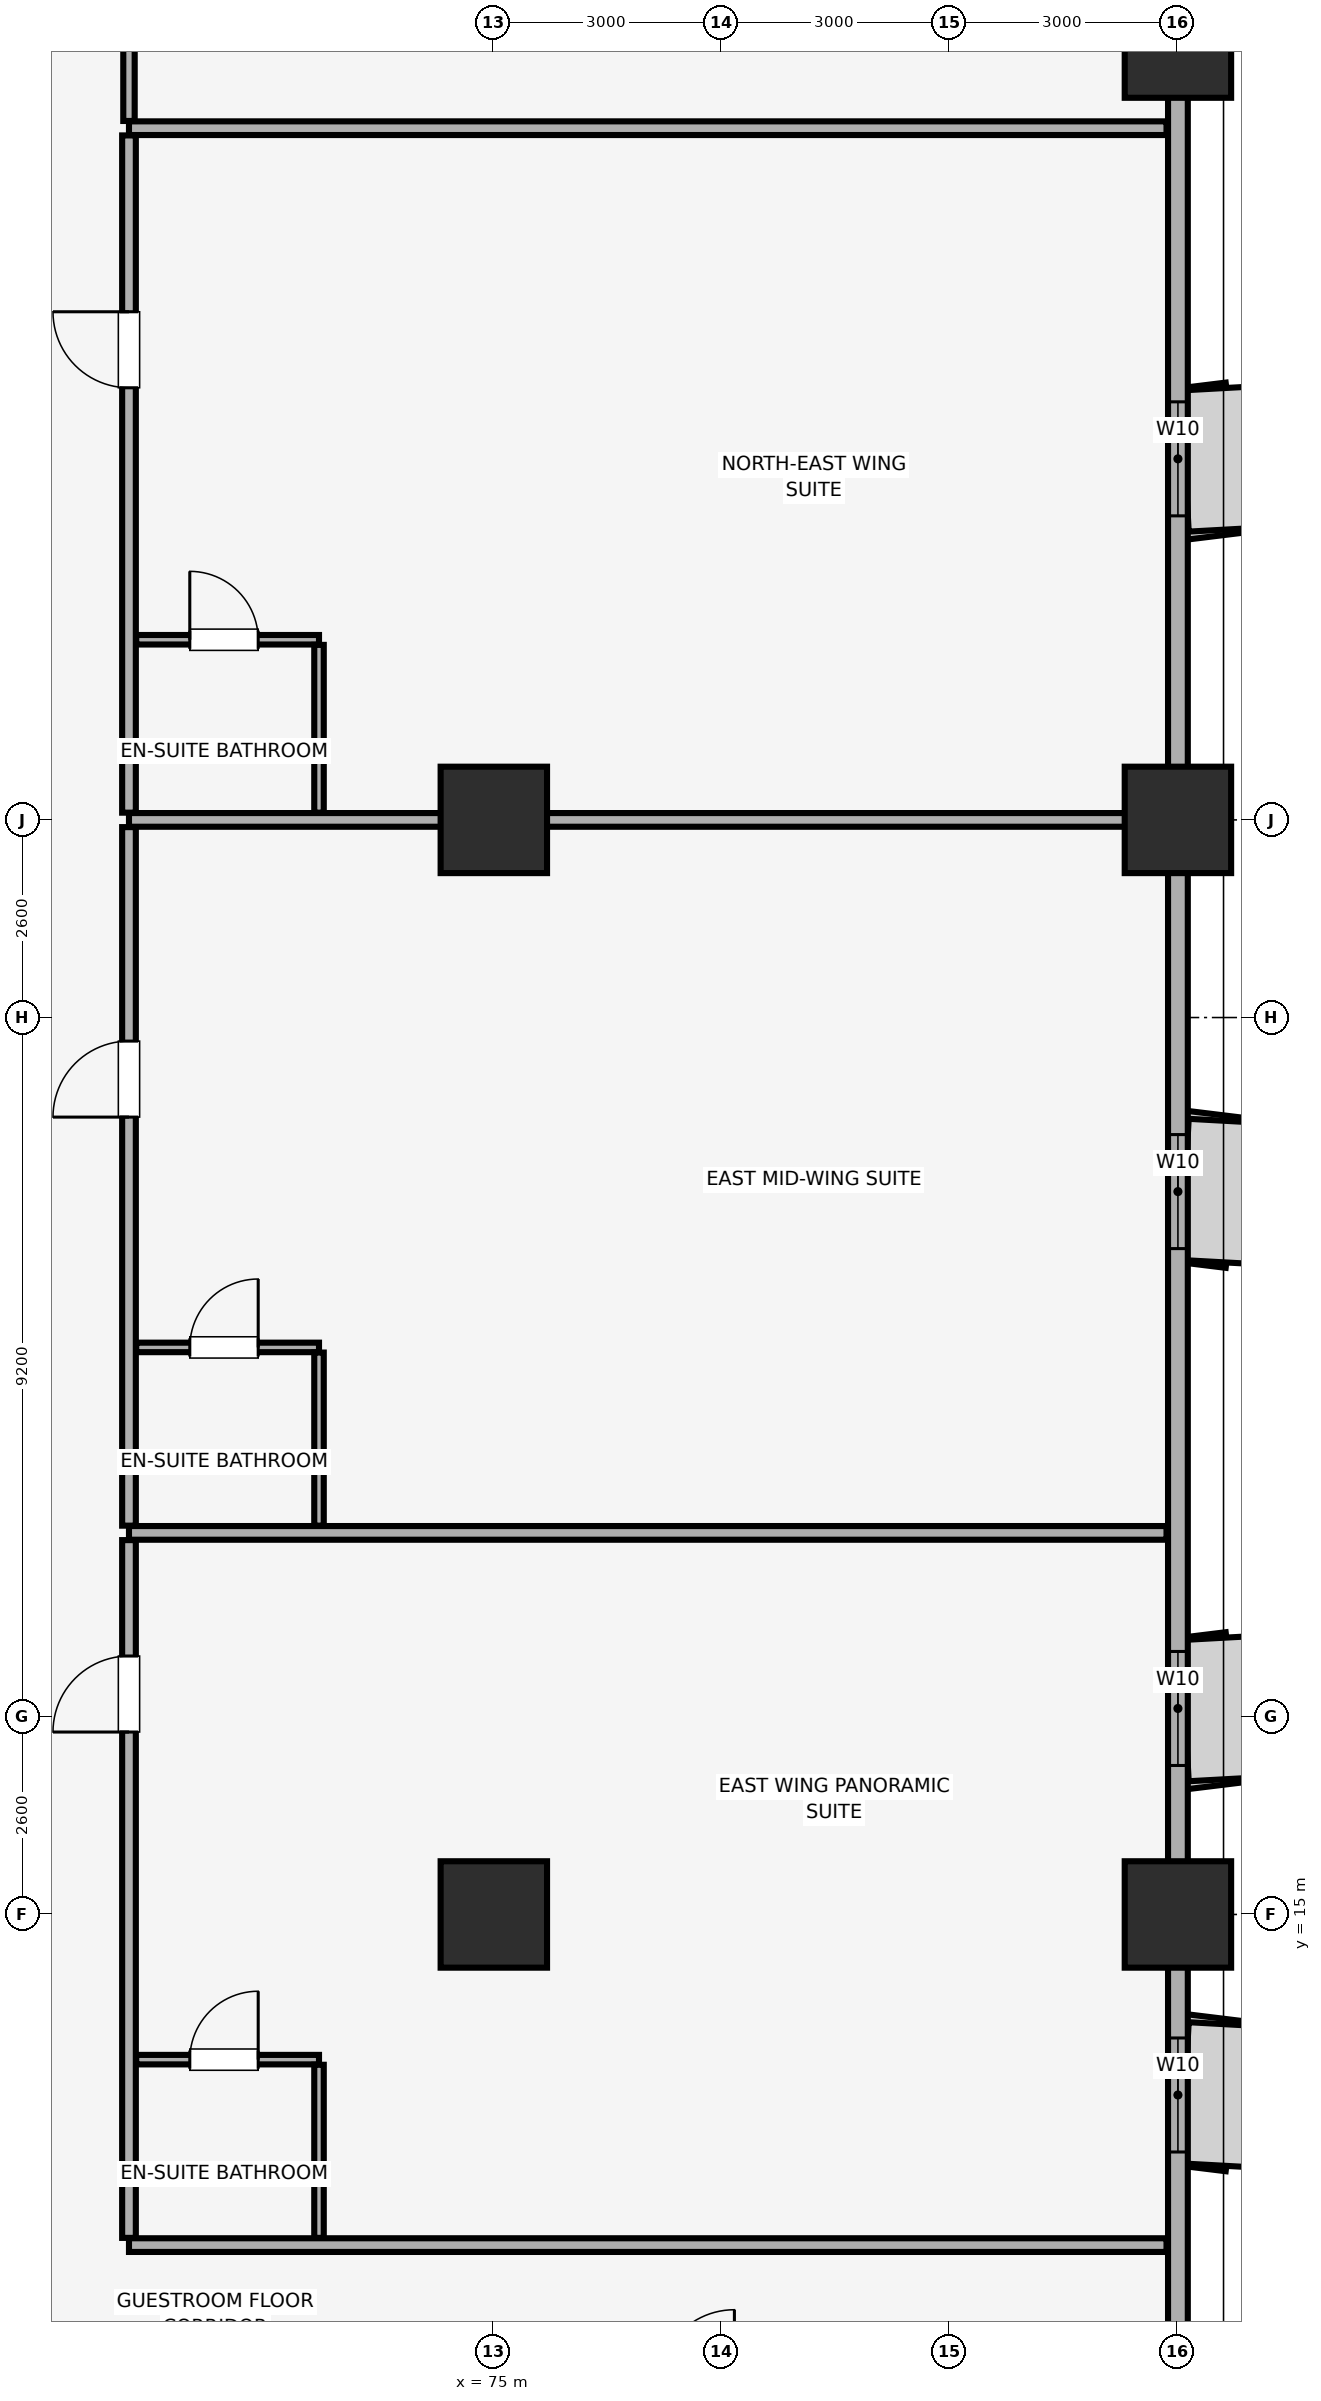
"""IFC4 building model, lengths in metres.
Left out: names, types, materials, properties, quantities, classifications, styles, units other than length and angle.
Written with IfcOpenShell. Run it as: python <this file> out.ifc"""

import sys

from ifc_helpers import new_model, si_unit, direction, frame, frame_2d, origin, origin_2d, place, context, subcontext, project, spatial, rectangle, extrude, element, fill, save


model = new_model("IFC4")
c1 = context("Model", 3, precision=1e-05, world=origin(), true_north=direction((0.0, 1.0)))
c2 = subcontext(c1, "Body", "Model", "MODEL_VIEW")
j1 = project(units=[si_unit("LENGTHUNIT", "METRE"), si_unit("PLANEANGLEUNIT", "RADIAN")], contexts=[c1])
p1 = place(None, origin())
s1 = spatial("IfcSite", under=j1, at=p1, CompositionType="ELEMENT")
p2 = place(p1, origin())
s2 = spatial("IfcBuilding", under=s1, at=p2, CompositionType="ELEMENT")
p3 = place(p2, frame((0.0, 0.0, 35.15)))
s3 = spatial("IfcBuildingStorey", under=s2, at=p3, CompositionType="ELEMENT", Elevation=35.15)
for number, where, z_axis, x_axis in (
    (1, (84.0, 15.0, 0.0), (0.0, 0.0, 1.0), (1.0, 0.0, 0.0)),
    (2, (84.0, 29.4, 0.0), (0.0, 0.0, 1.0), (1.0, 0.0, 0.0)),
    (3, (84.0, 39.6, 0.0), (0.0, 0.0, 1.0), (1.0, 0.0, 0.0)),
    (4, (75.0, 15.0, 0.0), (0.0, 0.0, 1.0), (1.0, 0.0, 0.0)),
    (5, (75.0, 29.4, 0.0), (0.0, 0.0, 1.0), (1.0, 0.0, 0.0)),
):
    element("IfcColumn", number, at=place(p3, frame(where, z_axis=z_axis, x_axis=x_axis)), inside=s3, PredefinedType="COLUMN", context=c2, shape_type="SweptSolid", body=[
        extrude(rectangle(XDim=1.4, YDim=1.4, at=origin_2d()), origin(), (0.0, 0.0, 1.0), 3.51),
    ])
p4 = place(p3, frame((84.0, 4.2, 0.0), z_axis=(0.0, 0.0, 1.0), x_axis=(0.0, 1.0, 0.0)))
e6 = element("IfcWall", 6, at=p4, inside=s3, PredefinedType="SOLIDWALL", context=c2, shape_type="SweptSolid", body=[
    extrude(rectangle(XDim=40.6, YDim=0.26, at=frame_2d((20.3, 0.0))), origin(), (0.0, 0.0, 1.0), 2.56),
])
p5 = place(p4, frame((7.675, 0.0, 0.85)))
e7 = element("IfcOpeningElement", 7, at=p5, cuts=e6, PredefinedType="OPENING", context=c2, shape_type="SweptSolid", body=[
    extrude(rectangle(XDim=1.5, YDim=1.4, at=frame_2d((0.75, 0.7))), frame((0.0, 0.14, 0.0), z_axis=(0.0, -1.0, 0.0), x_axis=(1.0, 0.0, 0.0)), (0.0, 0.0, 1.0), 0.28),
])
p6 = place(p4, frame((12.76, 0.0, 0.85)))
e8 = element("IfcOpeningElement", 8, at=p6, cuts=e6, PredefinedType="OPENING", context=c2, shape_type="SweptSolid", body=[
    extrude(rectangle(XDim=1.5, YDim=1.4, at=frame_2d((0.75, 0.7))), frame((0.0, 0.14, 0.0), z_axis=(0.0, -1.0, 0.0), x_axis=(1.0, 0.0, 0.0)), (0.0, 0.0, 1.0), 0.28),
])
p7 = place(p4, frame((19.56, 0.0, 0.85)))
e9 = element("IfcOpeningElement", 9, at=p7, cuts=e6, PredefinedType="OPENING", context=c2, shape_type="SweptSolid", body=[
    extrude(rectangle(XDim=1.5, YDim=1.4, at=frame_2d((0.75, 0.7))), frame((0.0, 0.14, 0.0), z_axis=(0.0, -1.0, 0.0), x_axis=(1.0, 0.0, 0.0)), (0.0, 0.0, 1.0), 0.28),
])
p8 = place(p4, frame((29.2, 0.0, 0.85)))
e10 = element("IfcOpeningElement", 10, at=p8, cuts=e6, PredefinedType="OPENING", context=c2, shape_type="SweptSolid", body=[
    extrude(rectangle(XDim=1.5, YDim=1.4, at=frame_2d((0.75, 0.7))), frame((0.0, 0.14, 0.0), z_axis=(0.0, -1.0, 0.0), x_axis=(1.0, 0.0, 0.0)), (0.0, 0.0, 1.0), 0.28),
])
p9 = place(p4, frame((37.365, 0.0, 0.85)))
e11 = element("IfcOpeningElement", 11, at=p9, cuts=e6, PredefinedType="OPENING", context=c2, shape_type="SweptSolid", body=[
    extrude(rectangle(XDim=1.5, YDim=1.4, at=frame_2d((0.75, 0.7))), frame((0.0, 0.14, 0.0), z_axis=(0.0, -1.0, 0.0), x_axis=(1.0, 0.0, 0.0)), (0.0, 0.0, 1.0), 0.28),
])
for number, where, z_axis, x_axis in (
    (12, (70.2, 10.65, 0.0), (0.0, 0.0, 1.0), (1.0, 0.0, 0.0)),
    (13, (70.2, 20.02, 0.0), (0.0, 0.0, 1.0), (1.0, 0.0, 0.0)),
):
    element("IfcWall", number, at=place(p3, frame(where, z_axis=z_axis, x_axis=x_axis)), inside=s3, PredefinedType="PARTITIONING", context=c2, shape_type="SweptSolid", body=[
        extrude(rectangle(XDim=13.65, YDim=0.18, at=frame_2d((6.825, 0.0))), origin(), (0.0, 0.0, 1.0), 3.51),
    ])
p10 = place(p3, frame((70.2, 10.745, 0.0), z_axis=(0.0, 0.0, 1.0), x_axis=(0.0, 1.0, 0.0)))
e14 = element("IfcWall", 14, at=p10, inside=s3, PredefinedType="PARTITIONING", context=c2, shape_type="SweptSolid", body=[
    extrude(rectangle(XDim=9.18, YDim=0.18, at=frame_2d((4.59, 0.0))), origin(), (0.0, 0.0, 1.0), 3.51),
])
p11 = place(p10, frame((6.655, 0.0, 0.0)))
e15 = element("IfcOpeningElement", 15, at=p11, cuts=e14, PredefinedType="OPENING", context=c2, shape_type="SweptSolid", body=[
    extrude(rectangle(XDim=1.0, YDim=2.15, at=frame_2d((0.5, 1.075))), frame((0.0, 0.1, 0.0), z_axis=(0.0, -1.0, 0.0), x_axis=(1.0, 0.0, 0.0)), (0.0, 0.0, 1.0), 0.2),
])
p12 = place(p3, frame((70.295, 13.09, 0.0), z_axis=(0.0, 0.0, 1.0), x_axis=(1.0, 0.0, 0.0)))
e16 = element("IfcWall", 16, at=p12, inside=s3, PredefinedType="PARTITIONING", context=c2, shape_type="SweptSolid", body=[
    extrude(rectangle(XDim=2.405, YDim=0.125, at=frame_2d((1.203, 0.0))), origin(), (0.0, 0.0, 1.0), 3.51),
])
p13 = place(p12, frame((0.705, 0.0, 0.0)))
e17 = element("IfcOpeningElement", 17, at=p13, cuts=e16, PredefinedType="OPENING", context=c2, shape_type="SweptSolid", body=[
    extrude(rectangle(XDim=0.9, YDim=2.1, at=frame_2d((0.45, 1.05))), frame((0.0, 0.073, 0.0), z_axis=(0.0, -1.0, 0.0), x_axis=(1.0, 0.0, 0.0)), (0.0, 0.0, 1.0), 0.145),
])
p14 = place(p3, frame((72.7, 10.745, 0.0), z_axis=(0.0, 0.0, 1.0), x_axis=(0.0, 1.0, 0.0)))
e18 = element("IfcWall", 18, at=p14, inside=s3, PredefinedType="PARTITIONING", context=c2, shape_type="SweptSolid", body=[
    extrude(rectangle(XDim=2.277, YDim=0.125, at=frame_2d((1.139, 0.0))), origin(), (0.0, 0.0, 1.0), 3.51),
])
p15 = place(p3, frame((70.2, 29.4, 0.0), z_axis=(0.0, 0.0, 1.0), x_axis=(1.0, 0.0, 0.0)))
e19 = element("IfcWall", 19, at=p15, inside=s3, PredefinedType="PARTITIONING", context=c2, shape_type="SweptSolid", body=[
    extrude(rectangle(XDim=13.65, YDim=0.18, at=frame_2d((6.825, 0.0))), origin(), (0.0, 0.0, 1.0), 2.86),
])
p16 = place(p3, frame((70.2, 20.115, 0.0), z_axis=(0.0, 0.0, 1.0), x_axis=(0.0, 1.0, 0.0)))
e20 = element("IfcWall", 20, at=p16, inside=s3, PredefinedType="PARTITIONING", context=c2, shape_type="SweptSolid", body=[
    extrude(rectangle(XDim=9.19, YDim=0.18, at=frame_2d((4.595, 0.0))), origin(), (0.0, 0.0, 1.0), 3.51),
])
p17 = place(p16, frame((5.375, 0.0, 0.0)))
e21 = element("IfcOpeningElement", 21, at=p17, cuts=e20, PredefinedType="OPENING", context=c2, shape_type="SweptSolid", body=[
    extrude(rectangle(XDim=1.0, YDim=2.15, at=frame_2d((0.5, 1.075))), frame((0.0, 0.1, 0.0), z_axis=(0.0, -1.0, 0.0), x_axis=(1.0, 0.0, 0.0)), (0.0, 0.0, 1.0), 0.2),
])
p18 = place(p3, frame((70.295, 22.46, 0.0), z_axis=(0.0, 0.0, 1.0), x_axis=(1.0, 0.0, 0.0)))
e22 = element("IfcWall", 22, at=p18, inside=s3, PredefinedType="PARTITIONING", context=c2, shape_type="SweptSolid", body=[
    extrude(rectangle(XDim=2.405, YDim=0.125, at=frame_2d((1.203, 0.0))), origin(), (0.0, 0.0, 1.0), 3.51),
])
p19 = place(p18, frame((0.705, 0.0, 0.0)))
e23 = element("IfcOpeningElement", 23, at=p19, cuts=e22, PredefinedType="OPENING", context=c2, shape_type="SweptSolid", body=[
    extrude(rectangle(XDim=0.9, YDim=2.1, at=frame_2d((0.45, 1.05))), frame((0.0, 0.073, 0.0), z_axis=(0.0, -1.0, 0.0), x_axis=(1.0, 0.0, 0.0)), (0.0, 0.0, 1.0), 0.145),
])
p20 = place(p3, frame((72.7, 20.115, 0.0), z_axis=(0.0, 0.0, 1.0), x_axis=(0.0, 1.0, 0.0)))
e24 = element("IfcWall", 24, at=p20, inside=s3, PredefinedType="PARTITIONING", context=c2, shape_type="SweptSolid", body=[
    extrude(rectangle(XDim=2.278, YDim=0.125, at=frame_2d((1.139, 0.0))), origin(), (0.0, 0.0, 1.0), 3.51),
])
p21 = place(p3, frame((70.2, 38.5, 0.0), z_axis=(0.0, 0.0, 1.0), x_axis=(1.0, 0.0, 0.0)))
e25 = element("IfcWall", 25, at=p21, inside=s3, PredefinedType="PARTITIONING", context=c2, shape_type="SweptSolid", body=[
    extrude(rectangle(XDim=13.65, YDim=0.18, at=frame_2d((6.825, 0.0))), origin(), (0.0, 0.0, 1.0), 3.51),
])
p22 = place(p3, frame((70.2, 29.495, 0.0), z_axis=(0.0, 0.0, 1.0), x_axis=(0.0, 1.0, 0.0)))
e26 = element("IfcWall", 26, at=p22, inside=s3, PredefinedType="PARTITIONING", context=c2, shape_type="SweptSolid", body=[
    extrude(rectangle(XDim=8.91, YDim=0.18, at=frame_2d((4.455, 0.0))), origin(), (0.0, 0.0, 1.0), 3.51),
])
p23 = place(p22, frame((5.59, 0.0, 0.0)))
e27 = element("IfcOpeningElement", 27, at=p23, cuts=e26, PredefinedType="OPENING", context=c2, shape_type="SweptSolid", body=[
    extrude(rectangle(XDim=1.0, YDim=2.15, at=frame_2d((0.5, 1.075))), frame((0.0, 0.1, 0.0), z_axis=(0.0, -1.0, 0.0), x_axis=(1.0, 0.0, 0.0)), (0.0, 0.0, 1.0), 0.2),
])
p24 = place(p3, frame((70.295, 31.77, 0.0), z_axis=(0.0, 0.0, 1.0), x_axis=(1.0, 0.0, 0.0)))
e28 = element("IfcWall", 28, at=p24, inside=s3, PredefinedType="PARTITIONING", context=c2, shape_type="SweptSolid", body=[
    extrude(rectangle(XDim=2.405, YDim=0.125, at=frame_2d((1.203, 0.0))), origin(), (0.0, 0.0, 1.0), 3.51),
])
p25 = place(p24, frame((0.705, 0.0, 0.0)))
e29 = element("IfcOpeningElement", 29, at=p25, cuts=e28, PredefinedType="OPENING", context=c2, shape_type="SweptSolid", body=[
    extrude(rectangle(XDim=0.9, YDim=2.1, at=frame_2d((0.45, 1.05))), frame((0.0, 0.073, 0.0), z_axis=(0.0, -1.0, 0.0), x_axis=(1.0, 0.0, 0.0)), (0.0, 0.0, 1.0), 0.145),
])
p26 = place(p3, frame((72.7, 29.495, 0.0), z_axis=(0.0, 0.0, 1.0), x_axis=(0.0, 1.0, 0.0)))
e30 = element("IfcWall", 30, at=p26, inside=s3, PredefinedType="PARTITIONING", context=c2, shape_type="SweptSolid", body=[
    extrude(rectangle(XDim=2.207, YDim=0.125, at=frame_2d((1.104, 0.0))), origin(), (0.0, 0.0, 1.0), 3.51),
])
p27 = place(p3, frame((70.2, 38.595, 0.0), z_axis=(0.0, 0.0, 1.0), x_axis=(0.0, 1.0, 0.0)))
e31 = element("IfcWall", 31, at=p27, inside=s3, PredefinedType="PARTITIONING", context=c2, shape_type="SweptSolid", body=[
    extrude(rectangle(XDim=10.255, YDim=0.15, at=frame_2d((5.127, 0.0))), origin(), (0.0, 0.0, 1.0), 3.51),
])
p28 = place(p27, frame((2.255, 0.0, 0.0)))
e32 = element("IfcOpeningElement", 32, at=p28, cuts=e31, PredefinedType="OPENING", context=c2, shape_type="SweptSolid", body=[
    extrude(rectangle(XDim=1.0, YDim=2.15, at=frame_2d((0.5, 1.075))), frame((0.0, 0.085, 0.0), z_axis=(0.0, -1.0, 0.0), x_axis=(1.0, 0.0, 0.0)), (0.0, 0.0, 1.0), 0.17),
])
p29 = place(p5, origin())
e33 = element("IfcWindow", 33, at=p29, inside=s3, PartitioningType="SINGLE_PANEL", PredefinedType="WINDOW", context=c2, shape_type="SweptSolid", body=[
    extrude(rectangle(XDim=1.5, YDim=1.4, at=frame_2d((0.75, 0.7))), frame((0.0, 0.03, 0.0), z_axis=(0.0, -1.0, 0.0), x_axis=(1.0, 0.0, 0.0)), (0.0, 0.0, 1.0), 0.06),
])
fill(e7, e33)
p30 = place(p6, origin())
e34 = element("IfcWindow", 34, at=p30, inside=s3, PartitioningType="SINGLE_PANEL", PredefinedType="WINDOW", context=c2, shape_type="SweptSolid", body=[
    extrude(rectangle(XDim=1.5, YDim=1.4, at=frame_2d((0.75, 0.7))), frame((0.0, 0.03, 0.0), z_axis=(0.0, -1.0, 0.0), x_axis=(1.0, 0.0, 0.0)), (0.0, 0.0, 1.0), 0.06),
])
fill(e8, e34)
p31 = place(p7, origin())
e35 = element("IfcWindow", 35, at=p31, inside=s3, PartitioningType="SINGLE_PANEL", PredefinedType="WINDOW", context=c2, shape_type="SweptSolid", body=[
    extrude(rectangle(XDim=1.5, YDim=1.4, at=frame_2d((0.75, 0.7))), frame((0.0, 0.03, 0.0), z_axis=(0.0, -1.0, 0.0), x_axis=(1.0, 0.0, 0.0)), (0.0, 0.0, 1.0), 0.06),
])
fill(e9, e35)
p32 = place(p8, origin())
e36 = element("IfcWindow", 36, at=p32, inside=s3, PartitioningType="SINGLE_PANEL", PredefinedType="WINDOW", context=c2, shape_type="SweptSolid", body=[
    extrude(rectangle(XDim=1.5, YDim=1.4, at=frame_2d((0.75, 0.7))), frame((0.0, 0.03, 0.0), z_axis=(0.0, -1.0, 0.0), x_axis=(1.0, 0.0, 0.0)), (0.0, 0.0, 1.0), 0.06),
])
fill(e10, e36)
p33 = place(p11, origin())
e37 = element("IfcDoor", 37, at=p33, inside=s3, OperationType="SINGLE_SWING_LEFT", PredefinedType="DOOR", context=c2, shape_type="SweptSolid", body=[
    extrude(rectangle(XDim=1.0, YDim=2.15, at=frame_2d((0.5, 1.075))), frame((0.0, 0.025, 0.0), z_axis=(0.0, -1.0, 0.0), x_axis=(1.0, 0.0, 0.0)), (0.0, 0.0, 1.0), 0.05),
])
fill(e15, e37)
p34 = place(p13, origin())
e38 = element("IfcDoor", 38, at=p34, inside=s3, OperationType="SINGLE_SWING_RIGHT", PredefinedType="DOOR", context=c2, shape_type="SweptSolid", body=[
    extrude(rectangle(XDim=0.9, YDim=2.1, at=frame_2d((0.45, 1.05))), frame((0.0, 0.025, 0.0), z_axis=(0.0, -1.0, 0.0), x_axis=(1.0, 0.0, 0.0)), (0.0, 0.0, 1.0), 0.05),
])
fill(e17, e38)
p35 = place(p17, origin())
e39 = element("IfcDoor", 39, at=p35, inside=s3, OperationType="SINGLE_SWING_LEFT", PredefinedType="DOOR", context=c2, shape_type="SweptSolid", body=[
    extrude(rectangle(XDim=1.0, YDim=2.15, at=frame_2d((0.5, 1.075))), frame((0.0, 0.025, 0.0), z_axis=(0.0, -1.0, 0.0), x_axis=(1.0, 0.0, 0.0)), (0.0, 0.0, 1.0), 0.05),
])
fill(e21, e39)
p36 = place(p19, origin())
e40 = element("IfcDoor", 40, at=p36, inside=s3, OperationType="SINGLE_SWING_RIGHT", PredefinedType="DOOR", context=c2, shape_type="SweptSolid", body=[
    extrude(rectangle(XDim=0.9, YDim=2.1, at=frame_2d((0.45, 1.05))), frame((0.0, 0.025, 0.0), z_axis=(0.0, -1.0, 0.0), x_axis=(1.0, 0.0, 0.0)), (0.0, 0.0, 1.0), 0.05),
])
fill(e23, e40)
p37 = place(p23, origin())
e41 = element("IfcDoor", 41, at=p37, inside=s3, OperationType="SINGLE_SWING_RIGHT", PredefinedType="DOOR", context=c2, shape_type="SweptSolid", body=[
    extrude(rectangle(XDim=1.0, YDim=2.15, at=frame_2d((0.5, 1.075))), frame((0.0, 0.025, 0.0), z_axis=(0.0, -1.0, 0.0), x_axis=(1.0, 0.0, 0.0)), (0.0, 0.0, 1.0), 0.05),
])
fill(e27, e41)
p38 = place(p25, origin())
e42 = element("IfcDoor", 42, at=p38, inside=s3, OperationType="SINGLE_SWING_LEFT", PredefinedType="DOOR", context=c2, shape_type="SweptSolid", body=[
    extrude(rectangle(XDim=0.9, YDim=2.1, at=frame_2d((0.45, 1.05))), frame((0.0, 0.025, 0.0), z_axis=(0.0, -1.0, 0.0), x_axis=(1.0, 0.0, 0.0)), (0.0, 0.0, 1.0), 0.05),
])
fill(e29, e42)
save(model, sys.argv[1])
